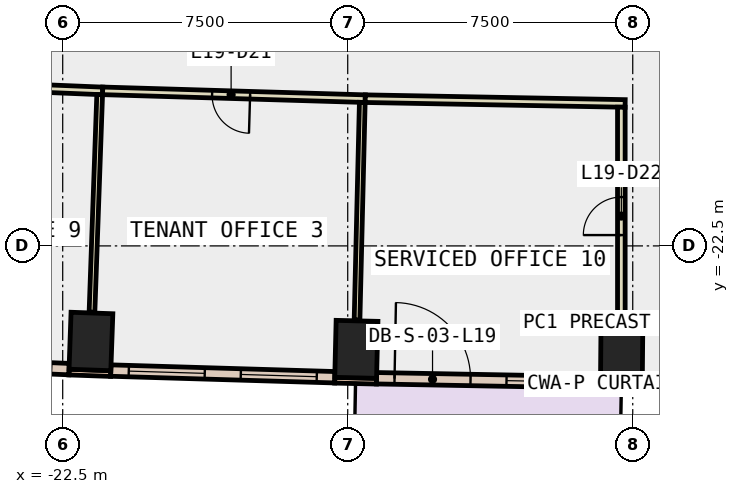
"""IFC4 building model, lengths in metres.
Left out: names, types, materials, properties, quantities, classifications, styles, units other than length and angle.
Written with IfcOpenShell. Run it as: python <this file> out.ifc"""

import sys

from ifc_helpers import new_model, si_unit, direction, frame, frame_2d, origin, origin_2d, place, context, subcontext, project, spatial, rectangle, extrude, element, fill, save


model = new_model("IFC4")
c1 = context("Model", 3, precision=1e-05, world=origin(), true_north=direction((0.0, 1.0)))
c2 = subcontext(c1, "Body", "Model", "MODEL_VIEW")
j1 = project(units=[si_unit("LENGTHUNIT", "METRE"), si_unit("PLANEANGLEUNIT", "RADIAN")], contexts=[c1])
p1 = place(None, origin())
s1 = spatial("IfcSite", under=j1, at=p1, CompositionType="ELEMENT")
p2 = place(p1, origin())
s2 = spatial("IfcBuilding", under=s1, at=p2, CompositionType="ELEMENT")
p3 = place(p2, frame((0.0, 0.0, 90.8)))
s3 = spatial("IfcBuildingStorey", under=s2, at=p3, CompositionType="ELEMENT", Elevation=90.8)
for number, where, z_axis, x_axis in (
    (1, (-21.757, -25.015, -0.4), (0.0, 0.0, 1.0), (-0.999, 0.035, 0.0)),
    (2, (-14.773, -25.222, -0.4), (0.0, 0.0, 1.0), (-1.0, 0.024, 0.0)),
    (3, (-7.792, -25.351, -0.4), (0.0, 0.0, 1.0), (-1.0, 0.009, 0.0)),
):
    element("IfcColumn", number, at=place(p3, frame(where, z_axis=z_axis, x_axis=x_axis)), inside=s3, PredefinedType="COLUMN", context=c2, shape_type="SweptSolid", body=[
        extrude(rectangle(XDim=1.1, YDim=1.5, at=origin_2d()), origin(), (0.0, 0.0, 1.0), 4.2),
    ])
p4 = place(p3, frame((-22.336, -25.82, 0.0), z_axis=(0.0, 0.0, 1.0), x_axis=(0.999376638472, -0.035303462679, 0.0)))
e4 = element("IfcWall", 4, at=p4, inside=s3, PredefinedType="STANDARD", context=c2, shape_type="SweptSolid", body=[
    extrude(rectangle(XDim=1.1, YDim=0.15, at=frame_2d((0.55, 0.0))), origin(), (0.0, 0.0, 1.0), 3.8),
])
p5 = place(p3, frame((-15.343, -26.034, 0.0), z_axis=(0.0, 0.0, 1.0), x_axis=(0.999718180159, -0.023739424163, 0.0)))
e5 = element("IfcWall", 5, at=p5, inside=s3, PredefinedType="STANDARD", context=c2, shape_type="SweptSolid", body=[
    extrude(rectangle(XDim=1.1, YDim=0.15, at=frame_2d((0.55, 0.0))), origin(), (0.0, 0.0, 1.0), 3.8),
])
p6 = place(p3, frame((-8.349, -26.171, 0.0), z_axis=(0.0, 0.0, 1.0), x_axis=(0.99995860686, -0.009098602504, 0.0)))
e6 = element("IfcWall", 6, at=p6, inside=s3, PredefinedType="STANDARD", context=c2, shape_type="SweptSolid", body=[
    extrude(rectangle(XDim=1.1, YDim=0.15, at=frame_2d((0.55, 0.0))), origin(), (0.0, 0.0, 1.0), 3.8),
])
p7 = place(p3, frame((-28.205, -25.501, 0.0), z_axis=(0.0, 0.0, 1.0), x_axis=(0.999159360905, -0.040994774244, 0.0)))
e7 = element("IfcWall", 7, at=p7, inside=s3, PredefinedType="STANDARD", context=c2, shape_type="SweptSolid", body=[
    extrude(rectangle(XDim=5.878, YDim=0.3, at=frame_2d((2.939, 0.0))), origin(), (0.0, 0.0, 1.0), 3.8),
])
p8 = place(p7, frame((0.469, 0.0, 0.9)))
e8 = element("IfcOpeningElement", 8, at=p8, cuts=e7, PredefinedType="OPENING", context=c2, shape_type="SweptSolid", body=[
    extrude(rectangle(XDim=2.0, YDim=2.6, at=frame_2d((1.0, 1.3))), frame((0.0, 0.16, 0.0), z_axis=(0.0, -1.0, 0.0), x_axis=(1.0, 0.0, 0.0)), (0.0, 0.0, 1.0), 0.32),
])
p9 = place(p7, frame((3.408, 0.0, 0.9)))
e9 = element("IfcOpeningElement", 9, at=p9, cuts=e7, PredefinedType="OPENING", context=c2, shape_type="SweptSolid", body=[
    extrude(rectangle(XDim=2.0, YDim=2.6, at=frame_2d((1.0, 1.3))), frame((0.0, 0.16, 0.0), z_axis=(0.0, -1.0, 0.0), x_axis=(1.0, 0.0, 0.0)), (0.0, 0.0, 1.0), 0.32),
])
p10 = place(p3, frame((-21.235, -25.78, 0.0), z_axis=(0.0, 0.0, 1.0), x_axis=(0.999554487555, -0.029846715213, 0.0)))
e10 = element("IfcWall", 10, at=p10, inside=s3, PredefinedType="STANDARD", context=c2, shape_type="SweptSolid", body=[
    extrude(rectangle(XDim=5.898, YDim=0.3, at=frame_2d((2.949, 0.0))), origin(), (0.0, 0.0, 1.0), 3.8),
])
p11 = place(p10, frame((0.474, 0.0, 0.9)))
e11 = element("IfcOpeningElement", 11, at=p11, cuts=e10, PredefinedType="OPENING", context=c2, shape_type="SweptSolid", body=[
    extrude(rectangle(XDim=2.0, YDim=2.6, at=frame_2d((1.0, 1.3))), frame((0.0, 0.16, 0.0), z_axis=(0.0, -1.0, 0.0), x_axis=(1.0, 0.0, 0.0)), (0.0, 0.0, 1.0), 0.32),
])
p12 = place(p10, frame((3.423, 0.0, 0.9)))
e12 = element("IfcOpeningElement", 12, at=p12, cuts=e10, PredefinedType="OPENING", context=c2, shape_type="SweptSolid", body=[
    extrude(rectangle(XDim=2.0, YDim=2.6, at=frame_2d((1.0, 1.3))), frame((0.0, 0.16, 0.0), z_axis=(0.0, -1.0, 0.0), x_axis=(1.0, 0.0, 0.0)), (0.0, 0.0, 1.0), 0.32),
])
p13 = place(p3, frame((-14.242, -25.982, 0.0), z_axis=(0.0, 0.0, 1.0), x_axis=(0.999828633111, -0.018512277318, 0.0)))
e13 = element("IfcWall", 13, at=p13, inside=s3, PredefinedType="STANDARD", context=c2, shape_type="SweptSolid", body=[
    extrude(rectangle(XDim=5.895, YDim=0.3, at=frame_2d((2.948, 0.0))), origin(), (0.0, 0.0, 1.0), 3.8),
])
p14 = place(p13, frame((0.474, 0.0, 0.0)))
e14 = element("IfcOpeningElement", 14, at=p14, cuts=e13, PredefinedType="OPENING", context=c2, shape_type="SweptSolid", body=[
    extrude(rectangle(XDim=2.0, YDim=2.4, at=frame_2d((1.0, 1.2))), frame((0.0, 0.16, 0.0), z_axis=(0.0, -1.0, 0.0), x_axis=(1.0, 0.0, 0.0)), (0.0, 0.0, 1.0), 0.32),
])
p15 = place(p13, frame((3.421, 0.0, 0.9)))
e15 = element("IfcOpeningElement", 15, at=p15, cuts=e13, PredefinedType="OPENING", context=c2, shape_type="SweptSolid", body=[
    extrude(rectangle(XDim=2.0, YDim=2.6, at=frame_2d((1.0, 1.3))), frame((0.0, 0.16, 0.0), z_axis=(0.0, -1.0, 0.0), x_axis=(1.0, 0.0, 0.0)), (0.0, 0.0, 1.0), 0.32),
])
p16 = place(p3, frame((-21.449, -18.422, 0.0), z_axis=(0.0, 0.0, 1.0), x_axis=(-0.999157588083, 0.041037960189, 0.0)))
e16 = element("IfcWall", 16, at=p16, inside=s3, PredefinedType="PARTITIONING", context=c2, shape_type="SweptSolid", body=[
    extrude(rectangle(XDim=6.169, YDim=0.2, at=frame_2d((3.084, 0.0))), origin(), (0.0, 0.0, 1.0), 3.8),
])
p17 = place(p16, frame((2.584, 0.0, 0.0)))
e17 = element("IfcOpeningElement", 17, at=p17, cuts=e16, PredefinedType="OPENING", context=c2, shape_type="SweptSolid", body=[
    extrude(rectangle(XDim=1.0, YDim=2.1, at=frame_2d((0.5, 1.05))), frame((0.0, 0.11, 0.0), z_axis=(0.0, -1.0, 0.0), x_axis=(1.0, 0.0, 0.0)), (0.0, 0.0, 1.0), 0.22),
])
p18 = place(p3, frame((-14.539, -18.626, 0.0), z_axis=(0.0, 0.0, 1.0), x_axis=(-0.999555675329, 0.029806910574, 0.0)))
e18 = element("IfcWall", 18, at=p18, inside=s3, PredefinedType="PARTITIONING", context=c2, shape_type="SweptSolid", body=[
    extrude(rectangle(XDim=6.913, YDim=0.2, at=frame_2d((3.457, 0.0))), origin(), (0.0, 0.0, 1.0), 3.8),
])
p19 = place(p18, frame((3.031, 0.0, 0.0)))
e19 = element("IfcOpeningElement", 19, at=p19, cuts=e18, PredefinedType="OPENING", context=c2, shape_type="SweptSolid", body=[
    extrude(rectangle(XDim=1.0, YDim=2.1, at=frame_2d((0.5, 1.05))), frame((0.0, 0.11, 0.0), z_axis=(0.0, -1.0, 0.0), x_axis=(1.0, 0.0, 0.0)), (0.0, 0.0, 1.0), 0.22),
])
p20 = place(p3, frame((-7.7, -18.752, 0.0), z_axis=(0.0, 0.0, 1.0), x_axis=(-0.999830394604, 0.018416895142, 0.0)))
e20 = element("IfcWall", 20, at=p20, inside=s3, PredefinedType="PARTITIONING", context=c2, shape_type="SweptSolid", body=[
    extrude(rectangle(XDim=6.84, YDim=0.2, at=frame_2d((3.42, 0.0))), origin(), (0.0, 0.0, 1.0), 3.8),
])
p21 = place(p3, frame((-7.8, -24.581, 0.0), z_axis=(0.0, 0.0, 1.0), x_axis=(0.0, 1.0, 0.0)))
e21 = element("IfcWall", 21, at=p21, inside=s3, PredefinedType="PARTITIONING", context=c2, shape_type="SweptSolid", body=[
    extrude(rectangle(XDim=5.731, YDim=0.2, at=frame_2d((2.865, 0.0))), origin(), (0.0, 0.0, 1.0), 3.8),
])
p22 = place(p21, frame((2.366, 0.0, 0.0)))
e22 = element("IfcOpeningElement", 22, at=p22, cuts=e21, PredefinedType="OPENING", context=c2, shape_type="SweptSolid", body=[
    extrude(rectangle(XDim=1.0, YDim=2.1, at=frame_2d((0.5, 1.05))), frame((0.0, 0.11, 0.0), z_axis=(0.0, -1.0, 0.0), x_axis=(1.0, 0.0, 0.0)), (0.0, 0.0, 1.0), 0.22),
])
p23 = place(p3, frame((-21.527, -18.519, 0.0), z_axis=(0.0, 0.0, 1.0), x_axis=(-0.035408838092, -0.999372910472, 0.0)))
e23 = element("IfcWall", 23, at=p23, inside=s3, PredefinedType="PARTITIONING", context=c2, shape_type="SweptSolid", body=[
    extrude(rectangle(XDim=5.73, YDim=0.15, at=frame_2d((2.865, 0.0))), origin(), (0.0, 0.0, 1.0), 3.8),
])
p24 = place(p3, frame((-14.617, -18.724, 0.0), z_axis=(0.0, 0.0, 1.0), x_axis=(-0.02407553942, -0.999710142192, 0.0)))
e24 = element("IfcWall", 24, at=p24, inside=s3, PredefinedType="PARTITIONING", context=c2, shape_type="SweptSolid", body=[
    extrude(rectangle(XDim=5.729, YDim=0.15, at=frame_2d((2.865, 0.0))), origin(), (0.0, 0.0, 1.0), 3.8),
])
p25 = place(p11, origin())
e25 = element("IfcWindow", 25, at=p25, inside=s3, PartitioningType="SINGLE_PANEL", PredefinedType="WINDOW", context=c2, shape_type="SweptSolid", body=[
    extrude(rectangle(XDim=2.0, YDim=2.6, at=frame_2d((1.0, 1.3))), frame((0.0, 0.03, 0.0), z_axis=(0.0, -1.0, 0.0), x_axis=(1.0, 0.0, 0.0)), (0.0, 0.0, 1.0), 0.06),
])
fill(e11, e25)
p26 = place(p12, origin())
e26 = element("IfcWindow", 26, at=p26, inside=s3, PartitioningType="SINGLE_PANEL", PredefinedType="WINDOW", context=c2, shape_type="SweptSolid", body=[
    extrude(rectangle(XDim=2.0, YDim=2.6, at=frame_2d((1.0, 1.3))), frame((0.0, 0.03, 0.0), z_axis=(0.0, -1.0, 0.0), x_axis=(1.0, 0.0, 0.0)), (0.0, 0.0, 1.0), 0.06),
])
fill(e12, e26)
p27 = place(p14, origin())
e27 = element("IfcDoor", 27, at=p27, inside=s3, OperationType="SLIDING_TO_LEFT", PredefinedType="DOOR", context=c2, shape_type="SweptSolid", body=[
    extrude(rectangle(XDim=2.0, YDim=2.4, at=frame_2d((1.0, 1.2))), frame((0.0, 0.025, 0.0), z_axis=(0.0, -1.0, 0.0), x_axis=(1.0, 0.0, 0.0)), (0.0, 0.0, 1.0), 0.05),
])
fill(e14, e27)
p28 = place(p15, origin())
e28 = element("IfcWindow", 28, at=p28, inside=s3, PartitioningType="SINGLE_PANEL", PredefinedType="WINDOW", context=c2, shape_type="SweptSolid", body=[
    extrude(rectangle(XDim=2.0, YDim=2.6, at=frame_2d((1.0, 1.3))), frame((0.0, 0.03, 0.0), z_axis=(0.0, -1.0, 0.0), x_axis=(1.0, 0.0, 0.0)), (0.0, 0.0, 1.0), 0.06),
])
fill(e15, e28)
p29 = place(p19, origin())
e29 = element("IfcDoor", 29, at=p29, inside=s3, OperationType="SINGLE_SWING_LEFT", PredefinedType="DOOR", context=c2, shape_type="SweptSolid", body=[
    extrude(rectangle(XDim=1.0, YDim=2.1, at=frame_2d((0.5, 1.05))), frame((0.0, 0.025, 0.0), z_axis=(0.0, -1.0, 0.0), x_axis=(1.0, 0.0, 0.0)), (0.0, 0.0, 1.0), 0.05),
])
fill(e19, e29)
p30 = place(p22, origin())
e30 = element("IfcDoor", 30, at=p30, inside=s3, OperationType="SINGLE_SWING_LEFT", PredefinedType="DOOR", context=c2, shape_type="SweptSolid", body=[
    extrude(rectangle(XDim=1.0, YDim=2.1, at=frame_2d((0.5, 1.05))), frame((0.0, 0.025, 0.0), z_axis=(0.0, -1.0, 0.0), x_axis=(1.0, 0.0, 0.0)), (0.0, 0.0, 1.0), 0.05),
])
fill(e22, e30)
save(model, sys.argv[1])
